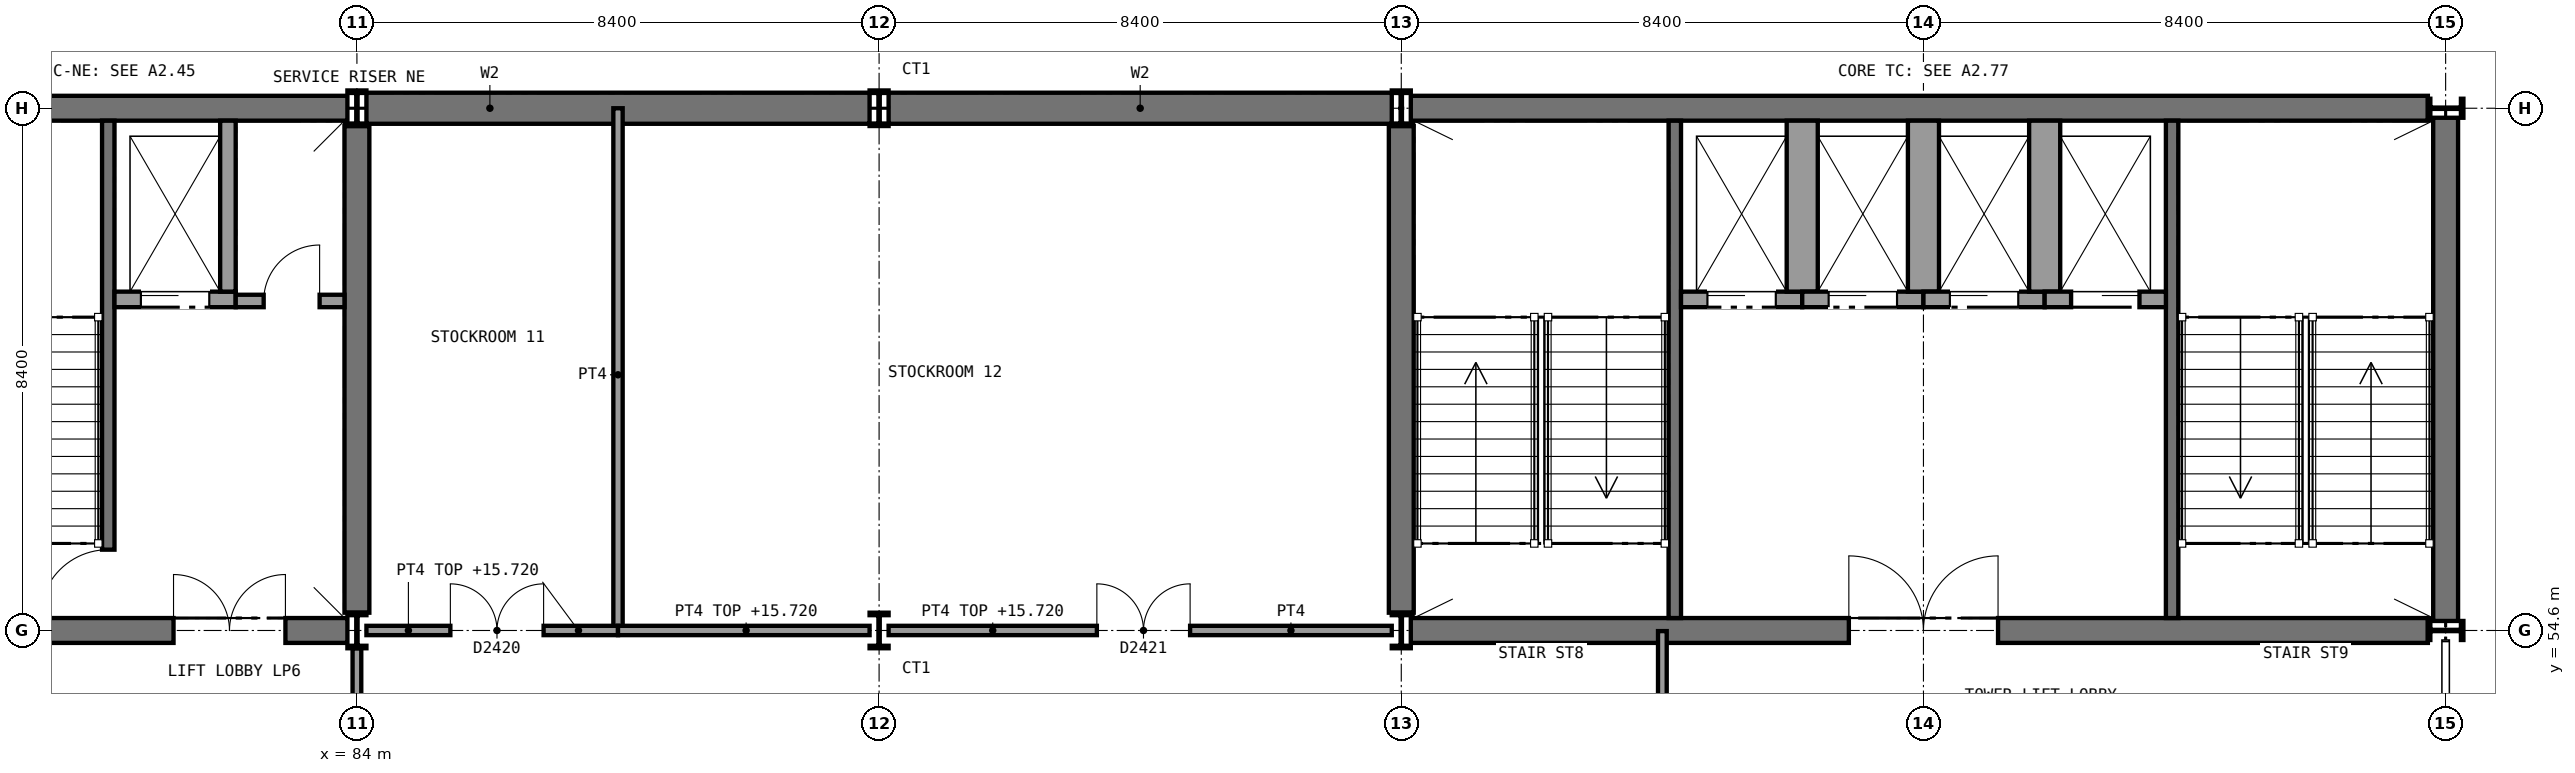
"""IFC4 building model, lengths in metres.
Left out: names, types, materials, properties, quantities, classifications, styles, units other than length and angle.
Written with IfcOpenShell. Run it as: python <this file> out.ifc"""

import sys

from ifc_helpers import new_model, si_unit, direction, frame, frame_2d, origin, origin_2d, place, context, subcontext, project, spatial, rectangle, i_section, extrude, element, fill, save


model = new_model("IFC4")
c1 = context("Model", 3, precision=1e-05, world=origin(), true_north=direction((0.0, 1.0)))
c2 = subcontext(c1, "Body", "Model", "MODEL_VIEW")
j1 = project(units=[si_unit("LENGTHUNIT", "METRE"), si_unit("PLANEANGLEUNIT", "RADIAN")], contexts=[c1])
p1 = place(None, origin())
s1 = spatial("IfcSite", under=j1, at=p1, CompositionType="ELEMENT")
p2 = place(p1, origin())
s2 = spatial("IfcBuilding", under=s1, at=p2, CompositionType="ELEMENT")
p3 = place(p2, frame((0.0, 0.0, 11.4)))
s3 = spatial("IfcBuildingStorey", under=s2, at=p3, CompositionType="ELEMENT", Elevation=11.4)
p4 = place(p3, frame((84.153, 63.0, 0.0), z_axis=(0.0, 0.0, 1.0), x_axis=(1.0, 0.0, 0.0)))
e1 = element("IfcWall", 1, at=p4, inside=s3, PredefinedType="SHEAR", context=c2, shape_type="SweptSolid", body=[
    extrude(rectangle(XDim=8.094, YDim=0.5, at=frame_2d((4.047, 0.0))), origin(), (0.0, 0.0, 1.0), 4.65),
])
p5 = place(p3, frame((92.553, 63.0, 0.0), z_axis=(0.0, 0.0, 1.0), x_axis=(1.0, 0.0, 0.0)))
e2 = element("IfcWall", 2, at=p5, inside=s3, PredefinedType="SHEAR", context=c2, shape_type="SweptSolid", body=[
    extrude(rectangle(XDim=8.094, YDim=0.5, at=frame_2d((4.047, 0.0))), origin(), (0.0, 0.0, 1.0), 4.65),
])
p6 = place(p3, frame((75.75, 63.0, 0.0), z_axis=(0.0, 0.0, 1.0), x_axis=(1.0, 0.0, 0.0)))
e3 = element("IfcWall", 3, at=p6, inside=s3, PredefinedType="SHEAR", context=c2, shape_type="SweptSolid", body=[
    extrude(rectangle(XDim=8.097, YDim=0.4, at=frame_2d((4.048, 0.0))), origin(), (0.0, 0.0, 1.0), 4.65),
])
p7 = place(p3, frame((75.75, 54.6, 0.0), z_axis=(0.0, 0.0, 1.0), x_axis=(1.0, 0.0, 0.0)))
e4 = element("IfcWall", 4, at=p7, inside=s3, PredefinedType="SHEAR", context=c2, shape_type="SweptSolid", body=[
    extrude(rectangle(XDim=8.097, YDim=0.4, at=frame_2d((4.048, 0.0))), origin(), (0.0, 0.0, 1.0), 4.65),
])
p8 = place(p7, frame((1.15, 0.0, 0.0)))
e5 = element("IfcOpeningElement", 5, at=p8, cuts=e4, PredefinedType="OPENING", context=c2, shape_type="SweptSolid", body=[
    extrude(rectangle(XDim=1.8, YDim=2.1, at=frame_2d((0.9, 1.05))), frame((0.0, 0.21, 0.0), z_axis=(0.0, -1.0, 0.0), x_axis=(1.0, 0.0, 0.0)), (0.0, 0.0, 1.0), 0.42),
])
p9 = place(p7, frame((5.3, 0.0, 0.0)))
e6 = element("IfcOpeningElement", 6, at=p9, cuts=e4, PredefinedType="OPENING", context=c2, shape_type="SweptSolid", body=[
    extrude(rectangle(XDim=1.8, YDim=2.1, at=frame_2d((0.9, 1.05))), frame((0.0, 0.21, 0.0), z_axis=(0.0, -1.0, 0.0), x_axis=(1.0, 0.0, 0.0)), (0.0, 0.0, 1.0), 0.42),
])
p10 = place(p3, frame((84.0, 54.886, 0.0), z_axis=(0.0, 0.0, 1.0), x_axis=(0.0, 1.0, 0.0)))
e7 = element("IfcWall", 7, at=p10, inside=s3, PredefinedType="SHEAR", context=c2, shape_type="SweptSolid", body=[
    extrude(rectangle(XDim=7.828, YDim=0.4, at=frame_2d((3.914, 0.0))), origin(), (0.0, 0.0, 1.0), 4.65),
])
p11 = place(p3, frame((100.953, 63.0, 0.0), z_axis=(0.0, 0.0, 1.0), x_axis=(1.0, 0.0, 0.0)))
e8 = element("IfcWall", 8, at=p11, inside=s3, PredefinedType="SHEAR", context=c2, shape_type="SweptSolid", body=[
    extrude(rectangle(XDim=16.361, YDim=0.4, at=frame_2d((8.181, 0.0))), origin(), (0.0, 0.0, 1.0), 4.65),
])
p12 = place(p3, frame((100.953, 54.6, 0.0), z_axis=(0.0, 0.0, 1.0), x_axis=(1.0, 0.0, 0.0)))
e9 = element("IfcWall", 9, at=p12, inside=s3, PredefinedType="SHEAR", context=c2, shape_type="SweptSolid", body=[
    extrude(rectangle(XDim=16.361, YDim=0.4, at=frame_2d((8.181, 0.0))), origin(), (0.0, 0.0, 1.0), 4.65),
])
p13 = place(p12, frame((7.047, 0.0, 0.0)))
e10 = element("IfcOpeningElement", 10, at=p13, cuts=e9, PredefinedType="OPENING", context=c2, shape_type="SweptSolid", body=[
    extrude(rectangle(XDim=2.4, YDim=2.4, at=frame_2d((1.2, 1.2))), frame((0.0, 0.21, 0.0), z_axis=(0.0, -1.0, 0.0), x_axis=(1.0, 0.0, 0.0)), (0.0, 0.0, 1.0), 0.42),
])
p14 = place(p3, frame((100.8, 54.886, 0.0), z_axis=(0.0, 0.0, 1.0), x_axis=(0.0, 1.0, 0.0)))
e11 = element("IfcWall", 11, at=p14, inside=s3, PredefinedType="SHEAR", context=c2, shape_type="SweptSolid", body=[
    extrude(rectangle(XDim=7.828, YDim=0.4, at=frame_2d((3.914, 0.0))), origin(), (0.0, 0.0, 1.0), 4.65),
])
p15 = place(p3, frame((117.6, 54.753, 0.0), z_axis=(0.0, 0.0, 1.0), x_axis=(0.0, 1.0, 0.0)))
e12 = element("IfcWall", 12, at=p15, inside=s3, PredefinedType="SHEAR", context=c2, shape_type="SweptSolid", body=[
    extrude(rectangle(XDim=8.094, YDim=0.4, at=frame_2d((4.047, 0.0))), origin(), (0.0, 0.0, 1.0), 4.65),
])
for number, where, z_axis, x_axis in (
    (13, (84.0, 54.6, 0.0), (0.0, 0.0, 1.0), (1.0, 0.0, 0.0)),
    (14, (84.0, 63.0, 0.0), (0.0, 0.0, 1.0), (1.0, 0.0, 0.0)),
    (15, (92.4, 54.6, 0.0), (0.0, 0.0, 1.0), (1.0, 0.0, 0.0)),
    (16, (92.4, 63.0, 0.0), (0.0, 0.0, 1.0), (1.0, 0.0, 0.0)),
    (17, (100.8, 54.6, 0.0), (0.0, 0.0, 1.0), (1.0, 0.0, 0.0)),
    (18, (100.8, 63.0, 0.0), (0.0, 0.0, 1.0), (1.0, 0.0, 0.0)),
    (19, (117.6, 54.6, 0.0), (0.0, 0.0, 1.0), (0.0, 1.0, 0.0)),
    (20, (117.6, 63.0, 0.0), (0.0, 0.0, 1.0), (0.0, 1.0, 0.0)),
):
    element("IfcColumn", number, at=place(p3, frame(where, z_axis=z_axis, x_axis=x_axis)), inside=s3, PredefinedType="COLUMN", context=c2, shape_type="SweptSolid", body=[
        extrude(i_section(OverallWidth=0.306, OverallDepth=0.572, WebThickness=0.021, FlangeThickness=0.04, FilletRadius=0.027, at=origin_2d()), origin(), (0.0, 0.0, 1.0), 4.8),
    ])
p16 = place(p3, frame((88.2, 54.6, 0.0), z_axis=(0.0, 0.0, 1.0), x_axis=(0.0, 1.0, 0.0)))
e21 = element("IfcWall", 21, at=p16, inside=s3, PredefinedType="SOLIDWALL", context=c2, shape_type="SweptSolid", body=[
    extrude(rectangle(XDim=8.4, YDim=0.15, at=frame_2d((4.2, 0.0))), origin(), (0.0, 0.0, 1.0), 4.65),
])
p17 = place(p3, frame((84.153, 54.6, 0.0), z_axis=(0.0, 0.0, 1.0), x_axis=(1.0, 0.0, 0.0)))
e22 = element("IfcWall", 22, at=p17, inside=s3, PredefinedType="SOLIDWALL", context=c2, shape_type="SweptSolid", body=[
    extrude(rectangle(XDim=4.047, YDim=0.15, at=frame_2d((2.023, 0.0))), origin(), (0.0, 0.0, 1.0), 4.32),
])
p18 = place(p17, frame((1.35, 0.0, 0.0)))
e23 = element("IfcOpeningElement", 23, at=p18, cuts=e22, PredefinedType="OPENING", context=c2, shape_type="SweptSolid", body=[
    extrude(rectangle(XDim=1.5, YDim=2.1, at=frame_2d((0.75, 1.05))), frame((0.0, 0.085, 0.0), z_axis=(0.0, -1.0, 0.0), x_axis=(1.0, 0.0, 0.0)), (0.0, 0.0, 1.0), 0.17),
])
p19 = place(p3, frame((88.2, 54.6, 0.0), z_axis=(0.0, 0.0, 1.0), x_axis=(1.0, 0.0, 0.0)))
e24 = element("IfcWall", 24, at=p19, inside=s3, PredefinedType="SOLIDWALL", context=c2, shape_type="SweptSolid", body=[
    extrude(rectangle(XDim=4.047, YDim=0.15, at=frame_2d((2.023, 0.0))), origin(), (0.0, 0.0, 1.0), 4.32),
])
p20 = place(p3, frame((92.553, 54.6, 0.0), z_axis=(0.0, 0.0, 1.0), x_axis=(1.0, 0.0, 0.0)))
e25 = element("IfcWall", 25, at=p20, inside=s3, PredefinedType="SOLIDWALL", context=c2, shape_type="SweptSolid", body=[
    extrude(rectangle(XDim=8.094, YDim=0.15, at=frame_2d((4.047, 0.0))), origin(), (0.0, 0.0, 1.0), 4.32),
])
p21 = place(p20, frame((3.35, 0.0, 0.0)))
e26 = element("IfcOpeningElement", 26, at=p21, cuts=e25, PredefinedType="OPENING", context=c2, shape_type="SweptSolid", body=[
    extrude(rectangle(XDim=1.5, YDim=2.1, at=frame_2d((0.75, 1.05))), frame((0.0, 0.085, 0.0), z_axis=(0.0, -1.0, 0.0), x_axis=(1.0, 0.0, 0.0)), (0.0, 0.0, 1.0), 0.17),
])
p22 = place(p3, frame((84.0, 51.386, 0.0), z_axis=(0.0, 0.0, 1.0), x_axis=(0.0, 1.0, 0.0)))
e27 = element("IfcWall", 27, at=p22, inside=s3, PredefinedType="PARTITIONING", context=c2, shape_type="SweptSolid", body=[
    extrude(rectangle(XDim=2.928, YDim=0.14, at=frame_2d((1.464, 0.0))), origin(), (0.0, 0.0, 1.0), 4.21),
])
p23 = place(p3, frame((105.0, 51.36, 0.0), z_axis=(0.0, 0.0, 1.0), x_axis=(0.0, 1.0, 0.0)))
e28 = element("IfcWall", 28, at=p23, inside=s3, PredefinedType="PARTITIONING", context=c2, shape_type="SweptSolid", body=[
    extrude(rectangle(XDim=3.23, YDim=0.14, at=frame_2d((1.615, 0.0))), origin(), (0.0, 0.0, 1.0), 4.65),
])
p24 = place(p3, frame((80.0, 62.8, 0.0), z_axis=(0.0, 0.0, 1.0), x_axis=(0.0, -1.0, 0.0)))
e29 = element("IfcWall", 29, at=p24, inside=s3, PredefinedType="SHEAR", context=c2, shape_type="SweptSolid", body=[
    extrude(rectangle(XDim=8.0, YDim=0.2, at=frame_2d((4.0, 0.0))), origin(), (0.0, 0.0, 1.0), 4.65),
])
p25 = place(p24, frame((6.9, 0.0, 0.0)))
e30 = element("IfcOpeningElement", 30, at=p25, cuts=e29, PredefinedType="OPENING", context=c2, shape_type="SweptSolid", body=[
    extrude(rectangle(XDim=1.11, YDim=2.1, at=frame_2d((0.555, 1.05))), frame((0.0, 0.11, 0.0), z_axis=(0.0, -1.0, 0.0), x_axis=(1.0, 0.0, 0.0)), (0.0, 0.0, 1.0), 0.22),
])
p26 = place(p3, frame((80.1, 59.925, 0.0), z_axis=(0.0, 0.0, 1.0), x_axis=(1.0, 0.0, 0.0)))
e31 = element("IfcWall", 31, at=p26, inside=s3, PredefinedType="SOLIDWALL", context=c2, shape_type="SweptSolid", body=[
    extrude(rectangle(XDim=1.95, YDim=0.25, at=frame_2d((0.975, 0.0))), origin(), (0.0, 0.0, 1.0), 4.8),
])
p27 = place(p26, frame((0.425, 0.0, 0.0)))
e32 = element("IfcOpeningElement", 32, at=p27, cuts=e31, PredefinedType="OPENING", context=c2, shape_type="SweptSolid", body=[
    extrude(rectangle(XDim=1.1, YDim=2.1, at=frame_2d((0.55, 1.05))), frame((0.0, 0.135, 0.0), z_axis=(0.0, -1.0, 0.0), x_axis=(1.0, 0.0, 0.0)), (0.0, 0.0, 1.0), 0.27),
])
p28 = place(p3, frame((81.925, 62.8, 0.0), z_axis=(0.0, 0.0, 1.0), x_axis=(0.0, -1.0, 0.0)))
e33 = element("IfcWall", 33, at=p28, inside=s3, PredefinedType="SOLIDWALL", context=c2, shape_type="SweptSolid", body=[
    extrude(rectangle(XDim=2.75, YDim=0.25, at=frame_2d((1.375, 0.0))), origin(), (0.0, 0.0, 1.0), 4.8),
])
p29 = place(p3, frame((82.05, 59.9, 0.0), z_axis=(0.0, 0.0, 1.0), x_axis=(1.0, 0.0, 0.0)))
e34 = element("IfcWall", 34, at=p29, inside=s3, PredefinedType="PARTITIONING", context=c2, shape_type="SweptSolid", body=[
    extrude(rectangle(XDim=1.75, YDim=0.2, at=frame_2d((0.875, 0.0))), origin(), (0.0, 0.0, 1.0), 4.65),
])
p30 = place(p29, frame((0.45, 0.0, 0.0)))
e35 = element("IfcOpeningElement", 35, at=p30, cuts=e34, PredefinedType="OPENING", context=c2, shape_type="SweptSolid", body=[
    extrude(rectangle(XDim=0.9, YDim=2.1, at=frame_2d((0.45, 1.05))), frame((0.0, 0.11, 0.0), z_axis=(0.0, -1.0, 0.0), x_axis=(1.0, 0.0, 0.0)), (0.0, 0.0, 1.0), 0.22),
])
for number, where, z_axis, x_axis in (
    (36, (105.2, 62.8, 0.0), (0.0, 0.0, 1.0), (0.0, -1.0, 0.0)),
    (37, (113.2, 62.8, 0.0), (0.0, 0.0, 1.0), (0.0, -1.0, 0.0)),
):
    element("IfcWall", number, at=place(p3, frame(where, z_axis=z_axis, x_axis=x_axis)), inside=s3, PredefinedType="SHEAR", context=c2, shape_type="SweptSolid", body=[
        extrude(rectangle(XDim=8.0, YDim=0.2, at=frame_2d((4.0, 0.0))), origin(), (0.0, 0.0, 1.0), 4.65),
    ])
p31 = place(p3, frame((105.3, 59.925, 0.0), z_axis=(0.0, 0.0, 1.0), x_axis=(1.0, 0.0, 0.0)))
e38 = element("IfcWall", 38, at=p31, inside=s3, PredefinedType="SOLIDWALL", context=c2, shape_type="SweptSolid", body=[
    extrude(rectangle(XDim=1.95, YDim=0.25, at=frame_2d((0.975, 0.0))), origin(), (0.0, 0.0, 1.0), 4.8),
])
p32 = place(p31, frame((0.425, 0.0, 0.0)))
e39 = element("IfcOpeningElement", 39, at=p32, cuts=e38, PredefinedType="OPENING", context=c2, shape_type="SweptSolid", body=[
    extrude(rectangle(XDim=1.1, YDim=2.1, at=frame_2d((0.55, 1.05))), frame((0.0, 0.135, 0.0), z_axis=(0.0, -1.0, 0.0), x_axis=(1.0, 0.0, 0.0)), (0.0, 0.0, 1.0), 0.27),
])
p33 = place(p3, frame((107.25, 62.8, 0.0), z_axis=(0.0, 0.0, 1.0), x_axis=(0.0, -1.0, 0.0)))
e40 = element("IfcWall", 40, at=p33, inside=s3, PredefinedType="SOLIDWALL", context=c2, shape_type="SweptSolid", body=[
    extrude(rectangle(XDim=2.75, YDim=0.5, at=frame_2d((1.375, 0.0))), origin(), (0.0, 0.0, 1.0), 4.8),
])
p34 = place(p3, frame((107.25, 59.925, 0.0), z_axis=(0.0, 0.0, 1.0), x_axis=(1.0, 0.0, 0.0)))
e41 = element("IfcWall", 41, at=p34, inside=s3, PredefinedType="SOLIDWALL", context=c2, shape_type="SweptSolid", body=[
    extrude(rectangle(XDim=1.95, YDim=0.25, at=frame_2d((0.975, 0.0))), origin(), (0.0, 0.0, 1.0), 4.8),
])
p35 = place(p34, frame((0.425, 0.0, 0.0)))
e42 = element("IfcOpeningElement", 42, at=p35, cuts=e41, PredefinedType="OPENING", context=c2, shape_type="SweptSolid", body=[
    extrude(rectangle(XDim=1.1, YDim=2.1, at=frame_2d((0.55, 1.05))), frame((0.0, 0.135, 0.0), z_axis=(0.0, -1.0, 0.0), x_axis=(1.0, 0.0, 0.0)), (0.0, 0.0, 1.0), 0.27),
])
p36 = place(p3, frame((109.2, 62.8, 0.0), z_axis=(0.0, 0.0, 1.0), x_axis=(0.0, -1.0, 0.0)))
e43 = element("IfcWall", 43, at=p36, inside=s3, PredefinedType="SOLIDWALL", context=c2, shape_type="SweptSolid", body=[
    extrude(rectangle(XDim=2.75, YDim=0.5, at=frame_2d((1.375, 0.0))), origin(), (0.0, 0.0, 1.0), 4.8),
])
p37 = place(p3, frame((109.2, 59.925, 0.0), z_axis=(0.0, 0.0, 1.0), x_axis=(1.0, 0.0, 0.0)))
e44 = element("IfcWall", 44, at=p37, inside=s3, PredefinedType="SOLIDWALL", context=c2, shape_type="SweptSolid", body=[
    extrude(rectangle(XDim=1.95, YDim=0.25, at=frame_2d((0.975, 0.0))), origin(), (0.0, 0.0, 1.0), 4.8),
])
p38 = place(p37, frame((0.425, 0.0, 0.0)))
e45 = element("IfcOpeningElement", 45, at=p38, cuts=e44, PredefinedType="OPENING", context=c2, shape_type="SweptSolid", body=[
    extrude(rectangle(XDim=1.1, YDim=2.1, at=frame_2d((0.55, 1.05))), frame((0.0, 0.135, 0.0), z_axis=(0.0, -1.0, 0.0), x_axis=(1.0, 0.0, 0.0)), (0.0, 0.0, 1.0), 0.27),
])
p39 = place(p3, frame((111.15, 62.8, 0.0), z_axis=(0.0, 0.0, 1.0), x_axis=(0.0, -1.0, 0.0)))
e46 = element("IfcWall", 46, at=p39, inside=s3, PredefinedType="SOLIDWALL", context=c2, shape_type="SweptSolid", body=[
    extrude(rectangle(XDim=2.75, YDim=0.5, at=frame_2d((1.375, 0.0))), origin(), (0.0, 0.0, 1.0), 4.8),
])
p40 = place(p3, frame((111.15, 59.925, 0.0), z_axis=(0.0, 0.0, 1.0), x_axis=(1.0, 0.0, 0.0)))
e47 = element("IfcWall", 47, at=p40, inside=s3, PredefinedType="SOLIDWALL", context=c2, shape_type="SweptSolid", body=[
    extrude(rectangle(XDim=1.95, YDim=0.25, at=frame_2d((0.975, 0.0))), origin(), (0.0, 0.0, 1.0), 4.8),
])
p41 = place(p40, frame((0.425, 0.0, 0.0)))
e48 = element("IfcOpeningElement", 48, at=p41, cuts=e47, PredefinedType="OPENING", context=c2, shape_type="SweptSolid", body=[
    extrude(rectangle(XDim=1.1, YDim=2.1, at=frame_2d((0.55, 1.05))), frame((0.0, 0.135, 0.0), z_axis=(0.0, -1.0, 0.0), x_axis=(1.0, 0.0, 0.0)), (0.0, 0.0, 1.0), 0.27),
])
p42 = place(p18, origin())
e49 = element("IfcDoor", 49, at=p42, inside=s3, OperationType="DOUBLE_DOOR_SINGLE_SWING", PredefinedType="DOOR", context=c2, shape_type="SweptSolid", body=[
    extrude(rectangle(XDim=1.5, YDim=2.1, at=frame_2d((0.75, 1.05))), frame((0.0, 0.025, 0.0), z_axis=(0.0, -1.0, 0.0), x_axis=(1.0, 0.0, 0.0)), (0.0, 0.0, 1.0), 0.05),
])
fill(e23, e49)
p43 = place(p21, origin())
e50 = element("IfcDoor", 50, at=p43, inside=s3, OperationType="DOUBLE_DOOR_SINGLE_SWING", PredefinedType="DOOR", context=c2, shape_type="SweptSolid", body=[
    extrude(rectangle(XDim=1.5, YDim=2.1, at=frame_2d((0.75, 1.05))), frame((0.0, 0.025, 0.0), z_axis=(0.0, -1.0, 0.0), x_axis=(1.0, 0.0, 0.0)), (0.0, 0.0, 1.0), 0.05),
])
fill(e26, e50)
p44 = place(p25, frame((1.1, 0.0, 0.0), z_axis=(0.0, 0.0, 1.0), x_axis=(-1.0, 0.0, 0.0)))
e51 = element("IfcDoor", 51, at=p44, inside=s3, OperationType="SINGLE_SWING_LEFT", PredefinedType="DOOR", context=c2, shape_type="SweptSolid", body=[
    extrude(rectangle(XDim=1.1, YDim=2.1, at=frame_2d((0.55, 1.05))), frame((0.0, 0.025, 0.0), z_axis=(0.0, -1.0, 0.0), x_axis=(1.0, 0.0, 0.0)), (0.0, 0.0, 1.0), 0.05),
])
fill(e30, e51)
p45 = place(p27, frame((1.1, 0.0, 0.0), z_axis=(0.0, 0.0, 1.0), x_axis=(-1.0, 0.0, 0.0)))
e52 = element("IfcDoor", 52, at=p45, inside=s3, OperationType="SLIDING_TO_RIGHT", PredefinedType="DOOR", context=c2, shape_type="SweptSolid", body=[
    extrude(rectangle(XDim=1.1, YDim=2.1, at=frame_2d((0.55, 1.05))), frame((0.0, 0.025, 0.0), z_axis=(0.0, -1.0, 0.0), x_axis=(1.0, 0.0, 0.0)), (0.0, 0.0, 1.0), 0.05),
])
fill(e32, e52)
p46 = place(p30, origin())
e53 = element("IfcDoor", 53, at=p46, inside=s3, OperationType="SINGLE_SWING_RIGHT", PredefinedType="DOOR", context=c2, shape_type="SweptSolid", body=[
    extrude(rectangle(XDim=0.9, YDim=2.1, at=frame_2d((0.45, 1.05))), frame((0.0, 0.025, 0.0), z_axis=(0.0, -1.0, 0.0), x_axis=(1.0, 0.0, 0.0)), (0.0, 0.0, 1.0), 0.05),
])
fill(e35, e53)
p47 = place(p9, origin())
e54 = element("IfcDoor", 54, at=p47, inside=s3, OperationType="DOUBLE_DOOR_SINGLE_SWING", PredefinedType="DOOR", context=c2, shape_type="SweptSolid", body=[
    extrude(rectangle(XDim=1.8, YDim=2.1, at=frame_2d((0.9, 1.05))), frame((0.0, 0.025, 0.0), z_axis=(0.0, -1.0, 0.0), x_axis=(1.0, 0.0, 0.0)), (0.0, 0.0, 1.0), 0.05),
])
fill(e6, e54)
p48 = place(p32, frame((1.1, 0.0, 0.0), z_axis=(0.0, 0.0, 1.0), x_axis=(-1.0, 0.0, 0.0)))
e55 = element("IfcDoor", 55, at=p48, inside=s3, OperationType="SLIDING_TO_RIGHT", PredefinedType="DOOR", context=c2, shape_type="SweptSolid", body=[
    extrude(rectangle(XDim=1.1, YDim=2.1, at=frame_2d((0.55, 1.05))), frame((0.0, 0.025, 0.0), z_axis=(0.0, -1.0, 0.0), x_axis=(1.0, 0.0, 0.0)), (0.0, 0.0, 1.0), 0.05),
])
fill(e39, e55)
p49 = place(p35, frame((1.1, 0.0, 0.0), z_axis=(0.0, 0.0, 1.0), x_axis=(-1.0, 0.0, 0.0)))
e56 = element("IfcDoor", 56, at=p49, inside=s3, OperationType="SLIDING_TO_RIGHT", PredefinedType="DOOR", context=c2, shape_type="SweptSolid", body=[
    extrude(rectangle(XDim=1.1, YDim=2.1, at=frame_2d((0.55, 1.05))), frame((0.0, 0.025, 0.0), z_axis=(0.0, -1.0, 0.0), x_axis=(1.0, 0.0, 0.0)), (0.0, 0.0, 1.0), 0.05),
])
fill(e42, e56)
p50 = place(p38, frame((1.1, 0.0, 0.0), z_axis=(0.0, 0.0, 1.0), x_axis=(-1.0, 0.0, 0.0)))
e57 = element("IfcDoor", 57, at=p50, inside=s3, OperationType="SLIDING_TO_RIGHT", PredefinedType="DOOR", context=c2, shape_type="SweptSolid", body=[
    extrude(rectangle(XDim=1.1, YDim=2.1, at=frame_2d((0.55, 1.05))), frame((0.0, 0.025, 0.0), z_axis=(0.0, -1.0, 0.0), x_axis=(1.0, 0.0, 0.0)), (0.0, 0.0, 1.0), 0.05),
])
fill(e45, e57)
p51 = place(p41, frame((1.1, 0.0, 0.0), z_axis=(0.0, 0.0, 1.0), x_axis=(-1.0, 0.0, 0.0)))
e58 = element("IfcDoor", 58, at=p51, inside=s3, OperationType="SLIDING_TO_LEFT", PredefinedType="DOOR", context=c2, shape_type="SweptSolid", body=[
    extrude(rectangle(XDim=1.1, YDim=2.1, at=frame_2d((0.55, 1.05))), frame((0.0, 0.025, 0.0), z_axis=(0.0, -1.0, 0.0), x_axis=(1.0, 0.0, 0.0)), (0.0, 0.0, 1.0), 0.05),
])
fill(e48, e58)
p52 = place(p13, origin())
e59 = element("IfcDoor", 59, at=p52, inside=s3, OperationType="DOUBLE_DOOR_SINGLE_SWING", PredefinedType="DOOR", context=c2, shape_type="SweptSolid", body=[
    extrude(rectangle(XDim=2.4, YDim=2.4, at=frame_2d((1.2, 1.2))), frame((0.0, 0.025, 0.0), z_axis=(0.0, -1.0, 0.0), x_axis=(1.0, 0.0, 0.0)), (0.0, 0.0, 1.0), 0.05),
])
fill(e10, e59)
save(model, sys.argv[1])
